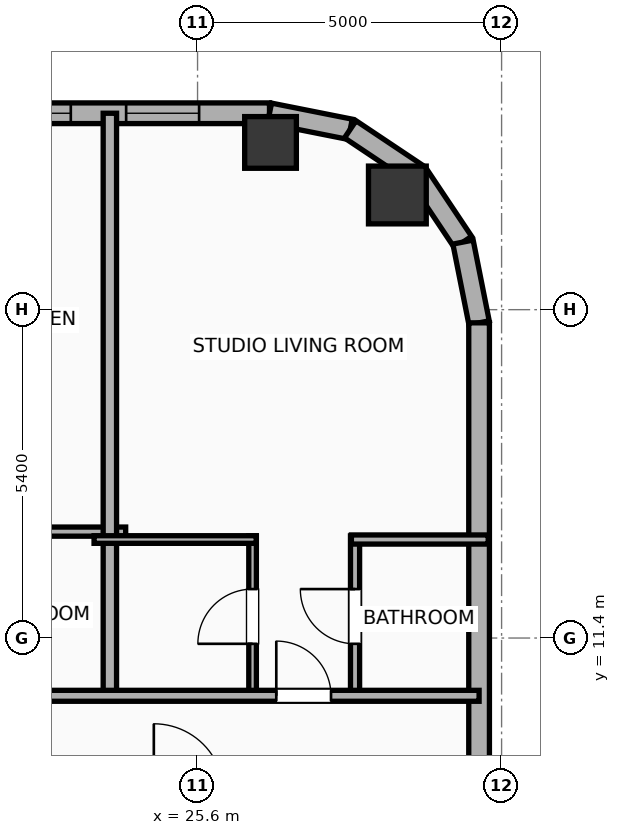
"""IFC4 building model, lengths in metres.
Left out: names, types, materials, properties, quantities, classifications, styles, units other than length and angle.
Written with IfcOpenShell. Run it as: python <this file> out.ifc"""

import sys

from ifc_helpers import new_model, si_unit, direction, frame, frame_2d, origin, origin_2d, place, context, subcontext, project, spatial, rectangle, hollow_rectangle, hollow_circle, extrude, element, fill, save


model = new_model("IFC4")
c1 = context("Model", 3, precision=1e-05, world=origin(), true_north=direction((0.0, 1.0)))
c2 = subcontext(c1, "Body", "Model", "MODEL_VIEW")
j1 = project(units=[si_unit("LENGTHUNIT", "METRE"), si_unit("PLANEANGLEUNIT", "RADIAN")], contexts=[c1])
p1 = place(None, origin())
s1 = spatial("IfcSite", under=j1, at=p1, CompositionType="ELEMENT")
p2 = place(p1, origin())
s2 = spatial("IfcBuilding", under=s1, at=p2, CompositionType="ELEMENT")
p3 = place(p2, frame((0.0, 0.0, 227.5)))
s3 = spatial("IfcBuildingStorey", under=s2, at=p3, CompositionType="ELEMENT", Elevation=227.5)
p4 = place(p3, frame((28.886, 18.686, 0.0), z_axis=(0.0, 0.0, 1.0), x_axis=(1.0, 0.0, 0.0)))
e1 = element("IfcColumn", 1, at=p4, inside=s3, PredefinedType="COLUMN", context=c2, shape_type="SweptSolid", body=[
    extrude(hollow_circle(Radius=0.475, WallThickness=0.032, at=origin_2d()), origin(), (0.0, 0.0, 1.0), 3.9),
])
p5 = place(p3, frame((26.8, 19.55, 0.0), z_axis=(0.0, 0.0, 1.0), x_axis=(1.0, 0.0, 0.0)))
e2 = element("IfcColumn", 2, at=p5, inside=s3, PredefinedType="COLUMN", context=c2, shape_type="SweptSolid", body=[
    extrude(hollow_rectangle(XDim=0.85, YDim=0.85, WallThickness=0.028, at=origin_2d()), origin(), (0.0, 0.0, 1.0), 3.9),
])
p6 = place(p3, frame((-22.783, 20.03, 0.0), z_axis=(0.0, 0.0, 1.0), x_axis=(1.0, 0.0, 0.0)))
e3 = element("IfcWall", 3, at=p6, inside=s3, PredefinedType="ELEMENTEDWALL", context=c2, shape_type="SweptSolid", body=[
    extrude(rectangle(XDim=49.566, YDim=0.34, at=frame_2d((24.783, 0.0))), origin(), (0.0, 0.0, 1.0), 3.65),
])
p7 = place(p6, frame((25.233, 0.0, 0.75)))
e4 = element("IfcOpeningElement", 4, at=p7, cuts=e3, PredefinedType="OPENING", context=c2, shape_type="SweptSolid", body=[
    extrude(rectangle(XDim=2.4, YDim=2.1, at=frame_2d((1.2, 1.05))), frame((0.0, 0.18, 0.0), z_axis=(0.0, -1.0, 0.0), x_axis=(1.0, 0.0, 0.0)), (0.0, 0.0, 1.0), 0.36),
])
p8 = place(p6, frame((41.756, 0.0, 0.75)))
e5 = element("IfcOpeningElement", 5, at=p8, cuts=e3, PredefinedType="OPENING", context=c2, shape_type="SweptSolid", body=[
    extrude(rectangle(XDim=2.4, YDim=2.1, at=frame_2d((1.2, 1.05))), frame((0.0, 0.18, 0.0), z_axis=(0.0, -1.0, 0.0), x_axis=(1.0, 0.0, 0.0)), (0.0, 0.0, 1.0), 0.36),
])
p9 = place(p6, frame((1.637, 0.0, 0.75)))
e6 = element("IfcOpeningElement", 6, at=p9, cuts=e3, PredefinedType="OPENING", context=c2, shape_type="SweptSolid", body=[
    extrude(rectangle(XDim=1.2, YDim=2.05, at=frame_2d((0.6, 1.025))), frame((0.0, 0.18, 0.0), z_axis=(0.0, -1.0, 0.0), x_axis=(1.0, 0.0, 0.0)), (0.0, 0.0, 1.0), 0.36),
])
p10 = place(p6, frame((8.019, 0.0, 0.75)))
e7 = element("IfcOpeningElement", 7, at=p10, cuts=e3, PredefinedType="OPENING", context=c2, shape_type="SweptSolid", body=[
    extrude(rectangle(XDim=1.2, YDim=2.05, at=frame_2d((0.6, 1.025))), frame((0.0, 0.18, 0.0), z_axis=(0.0, -1.0, 0.0), x_axis=(1.0, 0.0, 0.0)), (0.0, 0.0, 1.0), 0.36),
])
p11 = place(p6, frame((4.524, 0.0, 0.75)))
e8 = element("IfcOpeningElement", 8, at=p11, cuts=e3, PredefinedType="OPENING", context=c2, shape_type="SweptSolid", body=[
    extrude(rectangle(XDim=1.2, YDim=2.05, at=frame_2d((0.6, 1.025))), frame((0.0, 0.18, 0.0), z_axis=(0.0, -1.0, 0.0), x_axis=(1.0, 0.0, 0.0)), (0.0, 0.0, 1.0), 0.36),
])
p12 = place(p6, frame((11.678, 0.0, 0.75)))
e9 = element("IfcOpeningElement", 9, at=p12, cuts=e3, PredefinedType="OPENING", context=c2, shape_type="SweptSolid", body=[
    extrude(rectangle(XDim=1.2, YDim=2.05, at=frame_2d((0.6, 1.025))), frame((0.0, 0.18, 0.0), z_axis=(0.0, -1.0, 0.0), x_axis=(1.0, 0.0, 0.0)), (0.0, 0.0, 1.0), 0.36),
])
p13 = place(p6, frame((17.993, 0.0, 0.75)))
e10 = element("IfcOpeningElement", 10, at=p13, cuts=e3, PredefinedType="OPENING", context=c2, shape_type="SweptSolid", body=[
    extrude(rectangle(XDim=1.2, YDim=2.05, at=frame_2d((0.6, 1.025))), frame((0.0, 0.18, 0.0), z_axis=(0.0, -1.0, 0.0), x_axis=(1.0, 0.0, 0.0)), (0.0, 0.0, 1.0), 0.36),
])
p14 = place(p6, frame((15.138, 0.0, 0.75)))
e11 = element("IfcOpeningElement", 11, at=p14, cuts=e3, PredefinedType="OPENING", context=c2, shape_type="SweptSolid", body=[
    extrude(rectangle(XDim=1.2, YDim=2.05, at=frame_2d((0.6, 1.025))), frame((0.0, 0.18, 0.0), z_axis=(0.0, -1.0, 0.0), x_axis=(1.0, 0.0, 0.0)), (0.0, 0.0, 1.0), 0.36),
])
p15 = place(p6, frame((22.278, 0.0, 0.75)))
e12 = element("IfcOpeningElement", 12, at=p15, cuts=e3, PredefinedType="OPENING", context=c2, shape_type="SweptSolid", body=[
    extrude(rectangle(XDim=1.2, YDim=2.05, at=frame_2d((0.6, 1.025))), frame((0.0, 0.18, 0.0), z_axis=(0.0, -1.0, 0.0), x_axis=(1.0, 0.0, 0.0)), (0.0, 0.0, 1.0), 0.36),
])
p16 = place(p6, frame((30.384, 0.0, 0.75)))
e13 = element("IfcOpeningElement", 13, at=p16, cuts=e3, PredefinedType="OPENING", context=c2, shape_type="SweptSolid", body=[
    extrude(rectangle(XDim=0.85, YDim=2.05, at=frame_2d((0.425, 1.025))), frame((0.0, 0.18, 0.0), z_axis=(0.0, -1.0, 0.0), x_axis=(1.0, 0.0, 0.0)), (0.0, 0.0, 1.0), 0.36),
])
p17 = place(p6, frame((32.603, 0.0, 0.75)))
e14 = element("IfcOpeningElement", 14, at=p17, cuts=e3, PredefinedType="OPENING", context=c2, shape_type="SweptSolid", body=[
    extrude(rectangle(XDim=1.2, YDim=2.05, at=frame_2d((0.6, 1.025))), frame((0.0, 0.18, 0.0), z_axis=(0.0, -1.0, 0.0), x_axis=(1.0, 0.0, 0.0)), (0.0, 0.0, 1.0), 0.36),
])
p18 = place(p6, frame((37.223, 0.0, 0.75)))
e15 = element("IfcOpeningElement", 15, at=p18, cuts=e3, PredefinedType="OPENING", context=c2, shape_type="SweptSolid", body=[
    extrude(rectangle(XDim=1.2, YDim=2.05, at=frame_2d((0.6, 1.025))), frame((0.0, 0.18, 0.0), z_axis=(0.0, -1.0, 0.0), x_axis=(1.0, 0.0, 0.0)), (0.0, 0.0, 1.0), 0.36),
])
p19 = place(p6, frame((45.099, 0.0, 0.75)))
e16 = element("IfcOpeningElement", 16, at=p19, cuts=e3, PredefinedType="OPENING", context=c2, shape_type="SweptSolid", body=[
    extrude(rectangle(XDim=1.2, YDim=2.05, at=frame_2d((0.6, 1.025))), frame((0.0, 0.18, 0.0), z_axis=(0.0, -1.0, 0.0), x_axis=(1.0, 0.0, 0.0)), (0.0, 0.0, 1.0), 0.36),
])
p20 = place(p6, frame((47.209, 0.0, 0.75)))
e17 = element("IfcOpeningElement", 17, at=p20, cuts=e3, PredefinedType="OPENING", context=c2, shape_type="SweptSolid", body=[
    extrude(rectangle(XDim=1.2, YDim=2.05, at=frame_2d((0.6, 1.025))), frame((0.0, 0.18, 0.0), z_axis=(0.0, -1.0, 0.0), x_axis=(1.0, 0.0, 0.0)), (0.0, 0.0, 1.0), 0.36),
])
p21 = place(p3, frame((26.783, 20.03, 0.0), z_axis=(0.0, 0.0, 1.0), x_axis=(0.980788153188, -0.195075878998, 0.0)))
e18 = element("IfcWall", 18, at=p21, inside=s3, PredefinedType="ELEMENTEDWALL", context=c2, shape_type="SweptSolid", body=[
    extrude(rectangle(XDim=1.354, YDim=0.34, at=frame_2d((0.677, 0.0))), origin(), (0.0, 0.0, 1.0), 3.65),
])
for number, where, z_axis, x_axis in (
    (19, (28.111, 19.766, 0.0), (0.0, 0.0, 1.0), (0.831, -0.556, 0.0)),
    (20, (29.223, 19.023, 0.0), (0.0, 0.0, 1.0), (0.556, -0.831, 0.0)),
):
    element("IfcWall", number, at=place(p3, frame(where, z_axis=z_axis, x_axis=x_axis)), inside=s3, PredefinedType="ELEMENTEDWALL", context=c2, shape_type="SweptSolid", body=[
        extrude(rectangle(XDim=1.337, YDim=0.34, at=frame_2d((0.668, 0.0))), origin(), (0.0, 0.0, 1.0), 3.65),
    ])
p22 = place(p3, frame((29.966, 17.911, 0.0), z_axis=(0.0, 0.0, 1.0), x_axis=(0.195075878998, -0.980788153188, 0.0)))
e21 = element("IfcWall", 21, at=p22, inside=s3, PredefinedType="ELEMENTEDWALL", context=c2, shape_type="SweptSolid", body=[
    extrude(rectangle(XDim=1.354, YDim=0.34, at=frame_2d((0.677, 0.0))), origin(), (0.0, 0.0, 1.0), 3.65),
])
p23 = place(p3, frame((30.23, 16.583, 0.0), z_axis=(0.0, 0.0, 1.0), x_axis=(0.0, -1.0, 0.0)))
e22 = element("IfcWall", 22, at=p23, inside=s3, PredefinedType="ELEMENTEDWALL", context=c2, shape_type="SweptSolid", body=[
    extrude(rectangle(XDim=31.967, YDim=0.34, at=frame_2d((15.983, 0.0))), origin(), (0.0, 0.0, 1.0), 3.65),
])
p24 = place(p23, frame((30.106, 0.0, 0.75)))
e23 = element("IfcOpeningElement", 23, at=p24, cuts=e22, PredefinedType="OPENING", context=c2, shape_type="SweptSolid", body=[
    extrude(rectangle(XDim=1.2, YDim=2.05, at=frame_2d((0.6, 1.025))), frame((0.0, 0.18, 0.0), z_axis=(0.0, -1.0, 0.0), x_axis=(1.0, 0.0, 0.0)), (0.0, 0.0, 1.0), 0.36),
])
p25 = place(p23, frame((11.463, 0.0, 0.75)))
e24 = element("IfcOpeningElement", 24, at=p25, cuts=e22, PredefinedType="OPENING", context=c2, shape_type="SweptSolid", body=[
    extrude(rectangle(XDim=1.2, YDim=2.05, at=frame_2d((0.6, 1.025))), frame((0.0, 0.18, 0.0), z_axis=(0.0, -1.0, 0.0), x_axis=(1.0, 0.0, 0.0)), (0.0, 0.0, 1.0), 0.36),
])
p26 = place(p23, frame((20.363, 0.0, 0.75)))
e25 = element("IfcOpeningElement", 25, at=p26, cuts=e22, PredefinedType="OPENING", context=c2, shape_type="SweptSolid", body=[
    extrude(rectangle(XDim=1.2, YDim=2.05, at=frame_2d((0.6, 1.025))), frame((0.0, 0.18, 0.0), z_axis=(0.0, -1.0, 0.0), x_axis=(1.0, 0.0, 0.0)), (0.0, 0.0, 1.0), 0.36),
])
p27 = place(p3, frame((21.593, 13.15, 0.0), z_axis=(0.0, 0.0, 1.0), x_axis=(1.0, 0.0, 0.0)))
e26 = element("IfcWall", 26, at=p27, inside=s3, PredefinedType="PLUMBINGWALL", context=c2, shape_type="SweptSolid", body=[
    extrude(rectangle(XDim=2.825, YDim=0.15, at=frame_2d((1.413, 0.0))), origin(), (0.0, 0.0, 1.0), 3.65),
])
p28 = place(p3, frame((24.158, 10.37, 0.0), z_axis=(0.0, 0.0, 1.0), x_axis=(0.0, 1.0, 0.0)))
e27 = element("IfcWall", 27, at=p28, inside=s3, PredefinedType="PARTITIONING", context=c2, shape_type="SweptSolid", body=[
    extrude(rectangle(XDim=9.66, YDim=0.22, at=frame_2d((4.83, 0.0))), origin(), (0.0, 0.0, 1.0), 3.65),
])
p29 = place(p3, frame((26.505, 10.43, 0.0), z_axis=(0.0, 0.0, 1.0), x_axis=(0.0, 1.0, 0.0)))
e28 = element("IfcWall", 28, at=p29, inside=s3, PredefinedType="PARTITIONING", context=c2, shape_type="SweptSolid", body=[
    extrude(rectangle(XDim=2.65, YDim=0.125, at=frame_2d((1.325, 0.0))), origin(), (0.0, 0.0, 1.0), 3.65),
])
p30 = place(p29, frame((0.875, 0.0, 0.0)))
e29 = element("IfcOpeningElement", 29, at=p30, cuts=e28, PredefinedType="OPENING", context=c2, shape_type="SweptSolid", body=[
    extrude(rectangle(XDim=0.9, YDim=2.05, at=frame_2d((0.45, 1.025))), frame((0.0, 0.073, 0.0), z_axis=(0.0, -1.0, 0.0), x_axis=(1.0, 0.0, 0.0)), (0.0, 0.0, 1.0), 0.145),
])
p31 = place(p3, frame((28.19, 10.43, 0.0), z_axis=(0.0, 0.0, 1.0), x_axis=(0.0, 1.0, 0.0)))
e30 = element("IfcWall", 30, at=p31, inside=s3, PredefinedType="PLUMBINGWALL", context=c2, shape_type="SweptSolid", body=[
    extrude(rectangle(XDim=2.65, YDim=0.15, at=frame_2d((1.325, 0.0))), origin(), (0.0, 0.0, 1.0), 3.65),
])
p32 = place(p31, frame((0.875, 0.0, 0.0)))
e31 = element("IfcOpeningElement", 31, at=p32, cuts=e30, PredefinedType="OPENING", context=c2, shape_type="SweptSolid", body=[
    extrude(rectangle(XDim=0.9, YDim=2.05, at=frame_2d((0.45, 1.025))), frame((0.0, 0.085, 0.0), z_axis=(0.0, -1.0, 0.0), x_axis=(1.0, 0.0, 0.0)), (0.0, 0.0, 1.0), 0.17),
])
p33 = place(p3, frame((23.898, 13.02, 0.0), z_axis=(0.0, 0.0, 1.0), x_axis=(1.0, 0.0, 0.0)))
e32 = element("IfcWall", 32, at=p33, inside=s3, PredefinedType="PARTITIONING", context=c2, shape_type="SweptSolid", body=[
    extrude(rectangle(XDim=2.667, YDim=0.125, at=frame_2d((1.333, 0.0))), origin(), (0.0, 0.0, 1.0), 3.65),
])
p34 = place(p3, frame((28.13, 13.02, 0.0), z_axis=(0.0, 0.0, 1.0), x_axis=(1.0, 0.0, 0.0)))
e33 = element("IfcWall", 33, at=p34, inside=s3, PredefinedType="PLUMBINGWALL", context=c2, shape_type="SweptSolid", body=[
    extrude(rectangle(XDim=2.25, YDim=0.15, at=frame_2d((1.125, 0.0))), origin(), (0.0, 0.0, 1.0), 3.65),
])
p35 = place(p3, frame((-26.23, 10.45, 0.0), z_axis=(0.0, 0.0, 1.0), x_axis=(1.0, 0.0, 0.0)))
e34 = element("IfcWall", 34, at=p35, inside=s3, PredefinedType="PARTITIONING", context=c2, shape_type="SweptSolid", body=[
    extrude(rectangle(XDim=56.46, YDim=0.18, at=frame_2d((28.23, 0.0))), origin(), (0.0, 0.0, 1.0), 3.65),
])
p36 = place(p35, frame((3.072, 0.0, 0.0)))
e35 = element("IfcOpeningElement", 35, at=p36, cuts=e34, PredefinedType="OPENING", context=c2, shape_type="SweptSolid", body=[
    extrude(rectangle(XDim=1.15, YDim=2.05, at=frame_2d((0.575, 1.025))), frame((0.0, 0.1, 0.0), z_axis=(0.0, -1.0, 0.0), x_axis=(1.0, 0.0, 0.0)), (0.0, 0.0, 1.0), 0.2),
])
p37 = place(p35, frame((12.146, 0.0, 0.0)))
e36 = element("IfcOpeningElement", 36, at=p37, cuts=e34, PredefinedType="OPENING", context=c2, shape_type="SweptSolid", body=[
    extrude(rectangle(XDim=1.15, YDim=2.05, at=frame_2d((0.575, 1.025))), frame((0.0, 0.1, 0.0), z_axis=(0.0, -1.0, 0.0), x_axis=(1.0, 0.0, 0.0)), (0.0, 0.0, 1.0), 0.2),
])
p38 = place(p35, frame((22.302, 0.0, 0.0)))
e37 = element("IfcOpeningElement", 37, at=p38, cuts=e34, PredefinedType="OPENING", context=c2, shape_type="SweptSolid", body=[
    extrude(rectangle(XDim=1.15, YDim=2.05, at=frame_2d((0.575, 1.025))), frame((0.0, 0.1, 0.0), z_axis=(0.0, -1.0, 0.0), x_axis=(1.0, 0.0, 0.0)), (0.0, 0.0, 1.0), 0.2),
])
p39 = place(p35, frame((32.601, 0.0, 0.0)))
e38 = element("IfcOpeningElement", 38, at=p39, cuts=e34, PredefinedType="OPENING", context=c2, shape_type="SweptSolid", body=[
    extrude(rectangle(XDim=1.15, YDim=2.05, at=frame_2d((0.575, 1.025))), frame((0.0, 0.1, 0.0), z_axis=(0.0, -1.0, 0.0), x_axis=(1.0, 0.0, 0.0)), (0.0, 0.0, 1.0), 0.2),
])
p40 = place(p35, frame((40.941, 0.0, 0.0)))
e39 = element("IfcOpeningElement", 39, at=p40, cuts=e34, PredefinedType="OPENING", context=c2, shape_type="SweptSolid", body=[
    extrude(rectangle(XDim=0.9, YDim=2.05, at=frame_2d((0.45, 1.025))), frame((0.0, 0.1, 0.0), z_axis=(0.0, -1.0, 0.0), x_axis=(1.0, 0.0, 0.0)), (0.0, 0.0, 1.0), 0.2),
])
p41 = place(p35, frame((45.559, 0.0, 0.0)))
e40 = element("IfcOpeningElement", 40, at=p41, cuts=e34, PredefinedType="OPENING", context=c2, shape_type="SweptSolid", body=[
    extrude(rectangle(XDim=1.15, YDim=2.05, at=frame_2d((0.575, 1.025))), frame((0.0, 0.1, 0.0), z_axis=(0.0, -1.0, 0.0), x_axis=(1.0, 0.0, 0.0)), (0.0, 0.0, 1.0), 0.2),
])
p42 = place(p35, frame((53.125, 0.0, 0.0)))
e41 = element("IfcOpeningElement", 41, at=p42, cuts=e34, PredefinedType="OPENING", context=c2, shape_type="SweptSolid", body=[
    extrude(rectangle(XDim=0.9, YDim=2.05, at=frame_2d((0.45, 1.025))), frame((0.0, 0.1, 0.0), z_axis=(0.0, -1.0, 0.0), x_axis=(1.0, 0.0, 0.0)), (0.0, 0.0, 1.0), 0.2),
])
p43 = place(p19, origin())
e42 = element("IfcWindow", 42, at=p43, inside=s3, PartitioningType="SINGLE_PANEL", PredefinedType="WINDOW", context=c2, shape_type="SweptSolid", body=[
    extrude(rectangle(XDim=1.2, YDim=2.05, at=frame_2d((0.6, 1.025))), frame((0.0, 0.03, 0.0), z_axis=(0.0, -1.0, 0.0), x_axis=(1.0, 0.0, 0.0)), (0.0, 0.0, 1.0), 0.06),
])
fill(e16, e42)
p44 = place(p20, origin())
e43 = element("IfcWindow", 43, at=p44, inside=s3, PartitioningType="SINGLE_PANEL", PredefinedType="WINDOW", context=c2, shape_type="SweptSolid", body=[
    extrude(rectangle(XDim=1.2, YDim=2.05, at=frame_2d((0.6, 1.025))), frame((0.0, 0.03, 0.0), z_axis=(0.0, -1.0, 0.0), x_axis=(1.0, 0.0, 0.0)), (0.0, 0.0, 1.0), 0.06),
])
fill(e17, e43)
p45 = place(p30, origin())
e44 = element("IfcDoor", 44, at=p45, inside=s3, OperationType="SINGLE_SWING_LEFT", PredefinedType="DOOR", context=c2, shape_type="SweptSolid", body=[
    extrude(rectangle(XDim=0.9, YDim=2.05, at=frame_2d((0.45, 1.025))), frame((0.0, 0.025, 0.0), z_axis=(0.0, -1.0, 0.0), x_axis=(1.0, 0.0, 0.0)), (0.0, 0.0, 1.0), 0.05),
])
fill(e29, e44)
p46 = place(p32, origin())
e45 = element("IfcDoor", 45, at=p46, inside=s3, OperationType="SINGLE_SWING_RIGHT", PredefinedType="DOOR", context=c2, shape_type="SweptSolid", body=[
    extrude(rectangle(XDim=0.9, YDim=2.05, at=frame_2d((0.45, 1.025))), frame((0.0, 0.025, 0.0), z_axis=(0.0, -1.0, 0.0), x_axis=(1.0, 0.0, 0.0)), (0.0, 0.0, 1.0), 0.05),
])
fill(e31, e45)
p47 = place(p42, origin())
e46 = element("IfcDoor", 46, at=p47, inside=s3, OperationType="SINGLE_SWING_LEFT", PredefinedType="DOOR", context=c2, shape_type="SweptSolid", body=[
    extrude(rectangle(XDim=0.9, YDim=2.05, at=frame_2d((0.45, 1.025))), frame((0.0, 0.025, 0.0), z_axis=(0.0, -1.0, 0.0), x_axis=(1.0, 0.0, 0.0)), (0.0, 0.0, 1.0), 0.05),
])
fill(e41, e46)
save(model, sys.argv[1])
